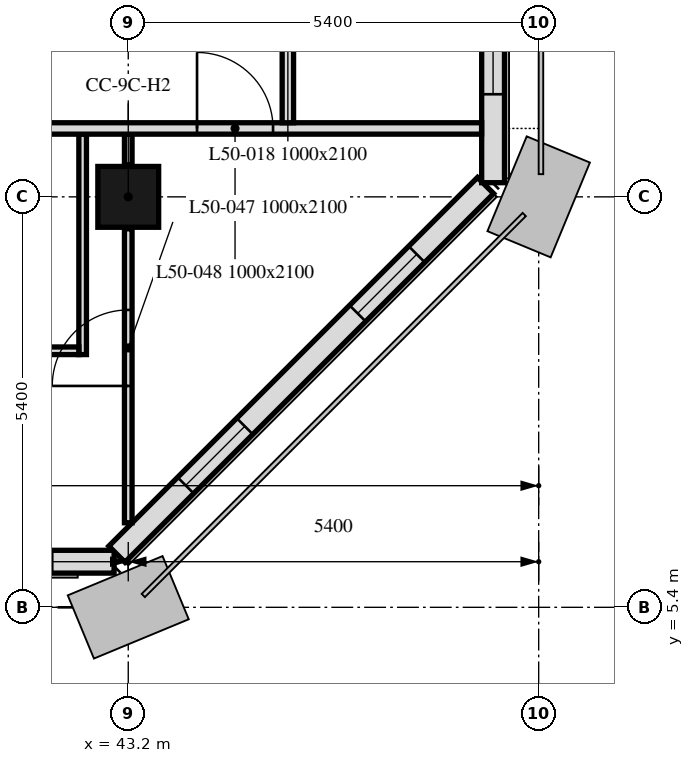
"""IFC4 building model, lengths in metres.
Left out: names, types, materials, properties, quantities, classifications, styles, units other than length and angle.
Written with IfcOpenShell. Run it as: python <this file> out.ifc"""

import sys

from ifc_helpers import new_model, si_unit, direction, frame, frame_2d, origin, origin_2d, place, context, subcontext, project, spatial, rectangle, extrude, element, fill, save


model = new_model("IFC4")
c1 = context("Model", 3, precision=1e-05, world=origin(), true_north=direction((0.0, 1.0)))
c2 = subcontext(c1, "Body", "Model", "MODEL_VIEW")
j1 = project(units=[si_unit("LENGTHUNIT", "METRE"), si_unit("PLANEANGLEUNIT", "RADIAN")], contexts=[c1])
p1 = place(None, origin())
s1 = spatial("IfcSite", under=j1, at=p1, CompositionType="ELEMENT")
p2 = place(p1, origin())
s2 = spatial("IfcBuilding", under=s1, at=p2, CompositionType="ELEMENT")
p3 = place(p2, frame((0.0, 0.0, 203.8)))
s3 = spatial("IfcBuildingStorey", under=s2, at=p3, CompositionType="ELEMENT", Elevation=203.8)
p4 = place(p3, frame((43.2, 10.8, 0.0), z_axis=(0.0, 0.0, 1.0), x_axis=(1.0, 0.0, 0.0)))
e1 = element("IfcColumn", 1, at=p4, inside=s3, PredefinedType="COLUMN", context=c2, shape_type="SweptSolid", body=[
    extrude(rectangle(XDim=0.8, YDim=0.8, at=origin_2d()), origin(), (0.0, 0.0, 1.0), 3.0),
])
p5 = place(p3, frame((10.986, 6.0, 0.0), z_axis=(0.0, 0.0, 1.0), x_axis=(1.0, 0.0, 0.0)))
e2 = element("IfcWall", 2, at=p5, inside=s3, PredefinedType="SOLIDWALL", context=c2, shape_type="SweptSolid", body=[
    extrude(rectangle(XDim=32.027, YDim=0.3, at=frame_2d((16.014, 0.0))), origin(), (0.0, 0.0, 1.0), 3.0),
])
p6 = place(p5, frame((2.764, 0.0, 0.9)))
e3 = element("IfcOpeningElement", 3, at=p6, cuts=e2, PredefinedType="OPENING", context=c2, shape_type="SweptSolid", body=[
    extrude(rectangle(XDim=1.1, YDim=1.7, at=frame_2d((0.55, 0.85))), frame((0.0, 0.16, 0.0), z_axis=(0.0, -1.0, 0.0), x_axis=(1.0, 0.0, 0.0)), (0.0, 0.0, 1.0), 0.32),
])
p7 = place(p5, frame((6.214, 0.0, 0.9)))
e4 = element("IfcOpeningElement", 4, at=p7, cuts=e2, PredefinedType="OPENING", context=c2, shape_type="SweptSolid", body=[
    extrude(rectangle(XDim=3.4, YDim=1.7, at=frame_2d((1.7, 0.85))), frame((0.0, 0.16, 0.0), z_axis=(0.0, -1.0, 0.0), x_axis=(1.0, 0.0, 0.0)), (0.0, 0.0, 1.0), 0.32),
])
p8 = place(p5, frame((13.564, 0.0, 0.9)))
e5 = element("IfcOpeningElement", 5, at=p8, cuts=e2, PredefinedType="OPENING", context=c2, shape_type="SweptSolid", body=[
    extrude(rectangle(XDim=1.1, YDim=1.7, at=frame_2d((0.55, 0.85))), frame((0.0, 0.16, 0.0), z_axis=(0.0, -1.0, 0.0), x_axis=(1.0, 0.0, 0.0)), (0.0, 0.0, 1.0), 0.32),
])
p9 = place(p5, frame((17.014, 0.0, 0.9)))
e6 = element("IfcOpeningElement", 6, at=p9, cuts=e2, PredefinedType="OPENING", context=c2, shape_type="SweptSolid", body=[
    extrude(rectangle(XDim=3.4, YDim=1.7, at=frame_2d((1.7, 0.85))), frame((0.0, 0.16, 0.0), z_axis=(0.0, -1.0, 0.0), x_axis=(1.0, 0.0, 0.0)), (0.0, 0.0, 1.0), 0.32),
])
p10 = place(p5, frame((24.364, 0.0, 0.9)))
e7 = element("IfcOpeningElement", 7, at=p10, cuts=e2, PredefinedType="OPENING", context=c2, shape_type="SweptSolid", body=[
    extrude(rectangle(XDim=1.1, YDim=1.7, at=frame_2d((0.55, 0.85))), frame((0.0, 0.16, 0.0), z_axis=(0.0, -1.0, 0.0), x_axis=(1.0, 0.0, 0.0)), (0.0, 0.0, 1.0), 0.32),
])
p11 = place(p5, frame((27.814, 0.0, 0.9)))
e8 = element("IfcOpeningElement", 8, at=p11, cuts=e2, PredefinedType="OPENING", context=c2, shape_type="SweptSolid", body=[
    extrude(rectangle(XDim=3.4, YDim=1.7, at=frame_2d((1.7, 0.85))), frame((0.0, 0.16, 0.0), z_axis=(0.0, -1.0, 0.0), x_axis=(1.0, 0.0, 0.0)), (0.0, 0.0, 1.0), 0.32),
])
p12 = place(p3, frame((43.051, 6.099, 0.0), z_axis=(0.0, 0.0, 1.0), x_axis=(0.707106781187, 0.707106781187, 0.0)))
e9 = element("IfcWall", 9, at=p12, inside=s3, PredefinedType="SOLIDWALL", context=c2, shape_type="SweptSolid", body=[
    extrude(rectangle(XDim=6.86, YDim=0.3, at=frame_2d((3.43, 0.0))), origin(), (0.0, 0.0, 1.0), 3.0),
])
p13 = place(p12, frame((1.28, 0.0, 0.9)))
e10 = element("IfcOpeningElement", 10, at=p13, cuts=e9, PredefinedType="OPENING", context=c2, shape_type="SweptSolid", body=[
    extrude(rectangle(XDim=1.1, YDim=1.7, at=frame_2d((0.55, 0.85))), frame((0.0, 0.16, 0.0), z_axis=(0.0, -1.0, 0.0), x_axis=(1.0, 0.0, 0.0)), (0.0, 0.0, 1.0), 0.32),
])
p14 = place(p12, frame((4.48, 0.0, 0.9)))
e11 = element("IfcOpeningElement", 11, at=p14, cuts=e9, PredefinedType="OPENING", context=c2, shape_type="SweptSolid", body=[
    extrude(rectangle(XDim=1.1, YDim=1.7, at=frame_2d((0.55, 0.85))), frame((0.0, 0.16, 0.0), z_axis=(0.0, -1.0, 0.0), x_axis=(1.0, 0.0, 0.0)), (0.0, 0.0, 1.0), 0.32),
])
p15 = place(p3, frame((48.0, 10.986, 0.0), z_axis=(0.0, 0.0, 1.0), x_axis=(0.0, 1.0, 0.0)))
e12 = element("IfcWall", 12, at=p15, inside=s3, PredefinedType="SOLIDWALL", context=c2, shape_type="SweptSolid", body=[
    extrude(rectangle(XDim=32.027, YDim=0.3, at=frame_2d((16.014, 0.0))), origin(), (0.0, 0.0, 1.0), 3.0),
])
p16 = place(p15, frame((1.164, 0.0, 0.9)))
e13 = element("IfcOpeningElement", 13, at=p16, cuts=e12, PredefinedType="OPENING", context=c2, shape_type="SweptSolid", body=[
    extrude(rectangle(XDim=1.1, YDim=1.7, at=frame_2d((0.55, 0.85))), frame((0.0, 0.16, 0.0), z_axis=(0.0, -1.0, 0.0), x_axis=(1.0, 0.0, 0.0)), (0.0, 0.0, 1.0), 0.32),
])
p17 = place(p15, frame((2.764, 0.0, 0.9)))
e14 = element("IfcOpeningElement", 14, at=p17, cuts=e12, PredefinedType="OPENING", context=c2, shape_type="SweptSolid", body=[
    extrude(rectangle(XDim=1.1, YDim=1.7, at=frame_2d((0.55, 0.85))), frame((0.0, 0.16, 0.0), z_axis=(0.0, -1.0, 0.0), x_axis=(1.0, 0.0, 0.0)), (0.0, 0.0, 1.0), 0.32),
])
p18 = place(p15, frame((6.214, 0.0, 0.9)))
e15 = element("IfcOpeningElement", 15, at=p18, cuts=e12, PredefinedType="OPENING", context=c2, shape_type="SweptSolid", body=[
    extrude(rectangle(XDim=3.4, YDim=1.7, at=frame_2d((1.7, 0.85))), frame((0.0, 0.16, 0.0), z_axis=(0.0, -1.0, 0.0), x_axis=(1.0, 0.0, 0.0)), (0.0, 0.0, 1.0), 0.32),
])
p19 = place(p15, frame((11.964, 0.0, 0.9)))
e16 = element("IfcOpeningElement", 16, at=p19, cuts=e12, PredefinedType="OPENING", context=c2, shape_type="SweptSolid", body=[
    extrude(rectangle(XDim=1.1, YDim=1.7, at=frame_2d((0.55, 0.85))), frame((0.0, 0.16, 0.0), z_axis=(0.0, -1.0, 0.0), x_axis=(1.0, 0.0, 0.0)), (0.0, 0.0, 1.0), 0.32),
])
p20 = place(p15, frame((13.564, 0.0, 0.9)))
e17 = element("IfcOpeningElement", 17, at=p20, cuts=e12, PredefinedType="OPENING", context=c2, shape_type="SweptSolid", body=[
    extrude(rectangle(XDim=1.1, YDim=1.7, at=frame_2d((0.55, 0.85))), frame((0.0, 0.16, 0.0), z_axis=(0.0, -1.0, 0.0), x_axis=(1.0, 0.0, 0.0)), (0.0, 0.0, 1.0), 0.32),
])
p21 = place(p15, frame((17.014, 0.0, 0.9)))
e18 = element("IfcOpeningElement", 18, at=p21, cuts=e12, PredefinedType="OPENING", context=c2, shape_type="SweptSolid", body=[
    extrude(rectangle(XDim=3.4, YDim=1.7, at=frame_2d((1.7, 0.85))), frame((0.0, 0.16, 0.0), z_axis=(0.0, -1.0, 0.0), x_axis=(1.0, 0.0, 0.0)), (0.0, 0.0, 1.0), 0.32),
])
p22 = place(p15, frame((22.764, 0.0, 0.9)))
e19 = element("IfcOpeningElement", 19, at=p22, cuts=e12, PredefinedType="OPENING", context=c2, shape_type="SweptSolid", body=[
    extrude(rectangle(XDim=1.1, YDim=1.7, at=frame_2d((0.55, 0.85))), frame((0.0, 0.16, 0.0), z_axis=(0.0, -1.0, 0.0), x_axis=(1.0, 0.0, 0.0)), (0.0, 0.0, 1.0), 0.32),
])
p23 = place(p15, frame((24.364, 0.0, 0.9)))
e20 = element("IfcOpeningElement", 20, at=p23, cuts=e12, PredefinedType="OPENING", context=c2, shape_type="SweptSolid", body=[
    extrude(rectangle(XDim=1.1, YDim=1.7, at=frame_2d((0.55, 0.85))), frame((0.0, 0.16, 0.0), z_axis=(0.0, -1.0, 0.0), x_axis=(1.0, 0.0, 0.0)), (0.0, 0.0, 1.0), 0.32),
])
p24 = place(p15, frame((28.789, 0.0, 0.9)))
e21 = element("IfcOpeningElement", 21, at=p24, cuts=e12, PredefinedType="OPENING", context=c2, shape_type="SweptSolid", body=[
    extrude(rectangle(XDim=0.65, YDim=1.7, at=frame_2d((0.325, 0.85))), frame((0.0, 0.16, 0.0), z_axis=(0.0, -1.0, 0.0), x_axis=(1.0, 0.0, 0.0)), (0.0, 0.0, 1.0), 0.32),
])
p25 = place(p15, frame((29.764, 0.0, 0.9)))
e22 = element("IfcOpeningElement", 22, at=p25, cuts=e12, PredefinedType="OPENING", context=c2, shape_type="SweptSolid", body=[
    extrude(rectangle(XDim=1.1, YDim=1.7, at=frame_2d((0.55, 0.85))), frame((0.0, 0.16, 0.0), z_axis=(0.0, -1.0, 0.0), x_axis=(1.0, 0.0, 0.0)), (0.0, 0.0, 1.0), 0.32),
])
p26 = place(p3, frame((43.2, 6.512, 0.0), z_axis=(0.0, 0.0, 1.0), x_axis=(0.0, 1.0, 0.0)))
e23 = element("IfcWall", 23, at=p26, inside=s3, PredefinedType="PARTITIONING", context=c2, shape_type="SweptSolid", body=[
    extrude(rectangle(XDim=3.868, YDim=0.1, at=frame_2d((1.934, 0.0))), origin(), (0.0, 0.0, 1.0), 3.0),
])
p27 = place(p26, frame((1.8, 0.0, 0.0)))
e24 = element("IfcOpeningElement", 24, at=p27, cuts=e23, PredefinedType="OPENING", context=c2, shape_type="SweptSolid", body=[
    extrude(rectangle(XDim=1.0, YDim=2.1, at=frame_2d((0.5, 1.05))), frame((0.0, 0.05, 0.0), z_axis=(0.0, -1.0, 0.0), x_axis=(1.0, 0.0, 0.0)), (0.0, 0.0, 1.0), 0.1),
])
p28 = place(p3, frame((43.2, 11.22, 0.0), z_axis=(0.0, 0.0, 1.0), x_axis=(0.0, 1.0, 0.0)))
e25 = element("IfcWall", 25, at=p28, inside=s3, PredefinedType="PARTITIONING", context=c2, shape_type="SweptSolid", body=[
    extrude(rectangle(XDim=0.405, YDim=0.1, at=frame_2d((0.203, 0.0))), origin(), (0.0, 0.0, 1.0), 3.0),
])
p29 = place(p3, frame((42.6, 11.625, 0.0), z_axis=(0.0, 0.0, 1.0), x_axis=(0.0, -1.0, 0.0)))
e26 = element("IfcWall", 26, at=p29, inside=s3, PredefinedType="PARTITIONING", context=c2, shape_type="SweptSolid", body=[
    extrude(rectangle(XDim=2.9, YDim=0.1, at=frame_2d((1.45, 0.0))), origin(), (0.0, 0.0, 1.0), 3.0),
])
p30 = place(p3, frame((42.55, 8.775, 0.0), z_axis=(0.0, 0.0, 1.0), x_axis=(-1.0, 0.0, 0.0)))
e27 = element("IfcWall", 27, at=p30, inside=s3, PredefinedType="PARTITIONING", context=c2, shape_type="SweptSolid", body=[
    extrude(rectangle(XDim=2.4, YDim=0.1, at=frame_2d((1.2, 0.0))), origin(), (0.0, 0.0, 1.0), 3.0),
])
p31 = place(p3, frame((6.151, 11.7, 0.0), z_axis=(0.0, 0.0, 1.0), x_axis=(1.0, 0.0, 0.0)))
e28 = element("IfcWall", 28, at=p31, inside=s3, PredefinedType="PARTITIONING", context=c2, shape_type="SweptSolid", body=[
    extrude(rectangle(XDim=41.698, YDim=0.15, at=frame_2d((20.849, 0.0))), origin(), (0.0, 0.0, 1.0), 3.0),
])
p32 = place(p31, frame((37.954, 0.0, 0.0)))
e29 = element("IfcOpeningElement", 29, at=p32, cuts=e28, PredefinedType="OPENING", context=c2, shape_type="SweptSolid", body=[
    extrude(rectangle(XDim=1.0, YDim=2.1, at=frame_2d((0.5, 1.05))), frame((0.0, 0.075, 0.0), z_axis=(0.0, -1.0, 0.0), x_axis=(1.0, 0.0, 0.0)), (0.0, 0.0, 1.0), 0.15),
])
p33 = place(p31, frame((6.849, 0.0, 0.0)))
e30 = element("IfcOpeningElement", 30, at=p33, cuts=e28, PredefinedType="OPENING", context=c2, shape_type="SweptSolid", body=[
    extrude(rectangle(XDim=1.0, YDim=2.1, at=frame_2d((0.5, 1.05))), frame((0.0, 0.075, 0.0), z_axis=(0.0, -1.0, 0.0), x_axis=(1.0, 0.0, 0.0)), (0.0, 0.0, 1.0), 0.15),
])
p34 = place(p31, frame((23.049, 0.0, 0.0)))
e31 = element("IfcOpeningElement", 31, at=p34, cuts=e28, PredefinedType="OPENING", context=c2, shape_type="SweptSolid", body=[
    extrude(rectangle(XDim=1.0, YDim=2.1, at=frame_2d((0.5, 1.05))), frame((0.0, 0.075, 0.0), z_axis=(0.0, -1.0, 0.0), x_axis=(1.0, 0.0, 0.0)), (0.0, 0.0, 1.0), 0.15),
])
p35 = place(p3, frame((45.3, 42.225, 0.0), z_axis=(0.0, 0.0, 1.0), x_axis=(0.0, -1.0, 0.0)))
e32 = element("IfcWall", 32, at=p35, inside=s3, PredefinedType="PARTITIONING", context=c2, shape_type="SweptSolid", body=[
    extrude(rectangle(XDim=30.45, YDim=0.15, at=frame_2d((15.225, 0.0))), origin(), (0.0, 0.0, 1.0), 2.4),
])
p36 = place(p35, frame((12.025, 0.0, 0.0)))
e33 = element("IfcOpeningElement", 33, at=p36, cuts=e32, PredefinedType="OPENING", context=c2, shape_type="SweptSolid", body=[
    extrude(rectangle(XDim=1.0, YDim=2.1, at=frame_2d((0.5, 1.05))), frame((0.0, 0.075, 0.0), z_axis=(0.0, -1.0, 0.0), x_axis=(1.0, 0.0, 0.0)), (0.0, 0.0, 1.0), 0.15),
])
p37 = place(p35, frame((27.775, 0.0, 0.0)))
e34 = element("IfcOpeningElement", 34, at=p37, cuts=e32, PredefinedType="OPENING", context=c2, shape_type="SweptSolid", body=[
    extrude(rectangle(XDim=1.0, YDim=2.1, at=frame_2d((0.5, 1.05))), frame((0.0, 0.075, 0.0), z_axis=(0.0, -1.0, 0.0), x_axis=(1.0, 0.0, 0.0)), (0.0, 0.0, 1.0), 0.15),
])
p38 = place(p35, frame((6.192, 0.0, 0.0)))
e35 = element("IfcOpeningElement", 35, at=p38, cuts=e32, PredefinedType="OPENING", context=c2, shape_type="SweptSolid", body=[
    extrude(rectangle(XDim=1.0, YDim=2.1, at=frame_2d((0.5, 1.05))), frame((0.0, 0.075, 0.0), z_axis=(0.0, -1.0, 0.0), x_axis=(1.0, 0.0, 0.0)), (0.0, 0.0, 1.0), 0.15),
])
p39 = place(p35, frame((21.475, 0.0, 0.0)))
e36 = element("IfcOpeningElement", 36, at=p39, cuts=e32, PredefinedType="OPENING", context=c2, shape_type="SweptSolid", body=[
    extrude(rectangle(XDim=1.0, YDim=2.1, at=frame_2d((0.5, 1.05))), frame((0.0, 0.075, 0.0), z_axis=(0.0, -1.0, 0.0), x_axis=(1.0, 0.0, 0.0)), (0.0, 0.0, 1.0), 0.15),
])
p40 = place(p13, origin())
e37 = element("IfcWindow", 37, at=p40, inside=s3, PartitioningType="SINGLE_PANEL", PredefinedType="WINDOW", context=c2, shape_type="SweptSolid", body=[
    extrude(rectangle(XDim=1.1, YDim=1.7, at=frame_2d((0.55, 0.85))), frame((0.0, 0.03, 0.0), z_axis=(0.0, -1.0, 0.0), x_axis=(1.0, 0.0, 0.0)), (0.0, 0.0, 1.0), 0.06),
])
fill(e10, e37)
p41 = place(p14, origin())
e38 = element("IfcWindow", 38, at=p41, inside=s3, PartitioningType="SINGLE_PANEL", PredefinedType="WINDOW", context=c2, shape_type="SweptSolid", body=[
    extrude(rectangle(XDim=1.1, YDim=1.7, at=frame_2d((0.55, 0.85))), frame((0.0, 0.03, 0.0), z_axis=(0.0, -1.0, 0.0), x_axis=(1.0, 0.0, 0.0)), (0.0, 0.0, 1.0), 0.06),
])
fill(e11, e38)
p42 = place(p16, origin())
e39 = element("IfcWindow", 39, at=p42, inside=s3, PartitioningType="SINGLE_PANEL", PredefinedType="WINDOW", context=c2, shape_type="SweptSolid", body=[
    extrude(rectangle(XDim=1.1, YDim=1.7, at=frame_2d((0.55, 0.85))), frame((0.0, 0.03, 0.0), z_axis=(0.0, -1.0, 0.0), x_axis=(1.0, 0.0, 0.0)), (0.0, 0.0, 1.0), 0.06),
])
fill(e13, e39)
p43 = place(p27, origin())
e40 = element("IfcDoor", 40, at=p43, inside=s3, OperationType="SINGLE_SWING_RIGHT", PredefinedType="DOOR", context=c2, shape_type="SweptSolid", body=[
    extrude(rectangle(XDim=1.0, YDim=2.1, at=frame_2d((0.5, 1.05))), frame((0.0, 0.025, 0.0), z_axis=(0.0, -1.0, 0.0), x_axis=(1.0, 0.0, 0.0)), (0.0, 0.0, 1.0), 0.05),
])
fill(e24, e40)
p44 = place(p32, origin())
e41 = element("IfcDoor", 41, at=p44, inside=s3, OperationType="SINGLE_SWING_LEFT", PredefinedType="DOOR", context=c2, shape_type="SweptSolid", body=[
    extrude(rectangle(XDim=1.0, YDim=2.1, at=frame_2d((0.5, 1.05))), frame((0.0, 0.025, 0.0), z_axis=(0.0, -1.0, 0.0), x_axis=(1.0, 0.0, 0.0)), (0.0, 0.0, 1.0), 0.05),
])
fill(e29, e41)
save(model, sys.argv[1])
